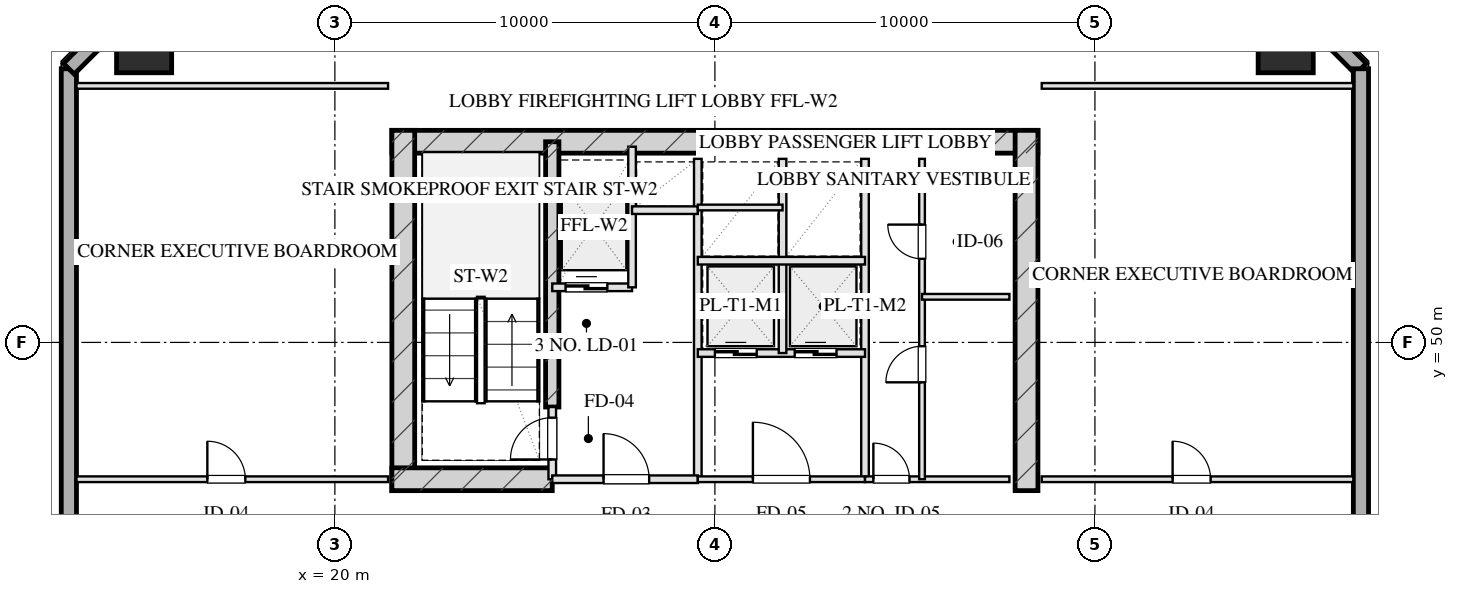
"""IFC4 building model, lengths in metres.
Left out: names, types, materials, properties, quantities, classifications, styles, units other than length and angle.
Written with IfcOpenShell. Run it as: python <this file> out.ifc"""

import sys

from ifc_helpers import new_model, si_unit, direction, frame, frame_2d, origin, origin_2d, place, context, subcontext, project, spatial, rectangle, hollow_rectangle, extrude, element, fill, save


model = new_model("IFC4")
c1 = context("Model", 3, precision=1e-05, world=origin(), true_north=direction((0.0, 1.0)))
c2 = subcontext(c1, "Body", "Model", "MODEL_VIEW")
j1 = project(units=[si_unit("LENGTHUNIT", "METRE"), si_unit("PLANEANGLEUNIT", "RADIAN")], contexts=[c1])
p1 = place(None, origin())
s1 = spatial("IfcSite", under=j1, at=p1, CompositionType="ELEMENT")
p2 = place(p1, origin())
s2 = spatial("IfcBuilding", under=s1, at=p2, CompositionType="ELEMENT")
p3 = place(p2, frame((0.0, 0.0, 170.2)))
s3 = spatial("IfcBuildingStorey", under=s2, at=p3, CompositionType="ELEMENT", Elevation=170.2)
p4 = place(p3, frame((21.5, 55.28, 0.0), z_axis=(0.0, 0.0, 1.0), x_axis=(1.0, 0.0, 0.0)))
e1 = element("IfcWall", 1, at=p4, inside=s3, PredefinedType="SHEAR", context=c2, shape_type="SweptSolid", body=[
    extrude(rectangle(XDim=17.0, YDim=0.6, at=frame_2d((8.5, 0.0))), origin(), (0.0, 0.0, 1.0), 3.45),
])
for number, where, z_axis, x_axis in (
    (2, (21.8, 46.1, 0.0), (0.0, 0.0, 1.0), (0.0, 1.0, 0.0)),
    (3, (38.2, 46.1, 0.0), (0.0, 0.0, 1.0), (0.0, 1.0, 0.0)),
):
    element("IfcWall", number, at=place(p3, frame(where, z_axis=z_axis, x_axis=x_axis)), inside=s3, PredefinedType="SHEAR", context=c2, shape_type="SweptSolid", body=[
        extrude(rectangle(XDim=9.48, YDim=0.6, at=frame_2d((4.74, 0.0))), origin(), (0.0, 0.0, 1.0), 3.45),
    ])
p5 = place(p3, frame((25.72, 48.3, 0.0), z_axis=(0.0, 0.0, 1.0), x_axis=(0.0, 1.0, 0.0)))
e4 = element("IfcWall", 4, at=p5, inside=s3, PredefinedType="SHEAR", context=c2, shape_type="SweptSolid", body=[
    extrude(rectangle(XDim=6.98, YDim=0.35, at=frame_2d((3.49, 0.0))), origin(), (0.0, 0.0, 1.0), 3.45),
])
p6 = place(p3, frame((21.5, 46.4, 0.0), z_axis=(0.0, 0.0, 1.0), x_axis=(1.0, 0.0, 0.0)))
e5 = element("IfcWall", 5, at=p6, inside=s3, PredefinedType="SHEAR", context=c2, shape_type="SweptSolid", body=[
    extrude(rectangle(XDim=4.22, YDim=0.6, at=frame_2d((2.11, 0.0))), origin(), (0.0, 0.0, 1.0), 3.45),
])
for number, where, z_axis, x_axis in (
    (6, (45.02, 57.82, 0.0), (0.0, 0.0, 1.0), (1.0, 0.0, 0.0)),
    (7, (14.98, 57.82, 0.0), (0.0, 0.0, 1.0), (1.0, 0.0, 0.0)),
):
    element("IfcColumn", number, at=place(p3, frame(where, z_axis=z_axis, x_axis=x_axis)), inside=s3, PredefinedType="COLUMN", context=c2, shape_type="SweptSolid", body=[
        extrude(hollow_rectangle(XDim=1.45, YDim=1.45, WallThickness=0.05, at=origin_2d()), origin(), (0.0, 0.0, 1.0), 3.451),
    ])
p7 = place(p3, frame((13.0, 10.8, 0.0), z_axis=(0.0, 0.0, 1.0), x_axis=(0.0, 1.0, 0.0)))
e8 = element("IfcWall", 8, at=p7, inside=s3, PredefinedType="SOLIDWALL", context=c2, shape_type="SweptSolid", body=[
    extrude(rectangle(XDim=46.4, YDim=0.4, at=frame_2d((23.2, 0.0))), origin(), (0.0, 0.0, 1.0), 2.61),
])
for number, where, z_axis, x_axis in (
    (9, (13.0, 57.2, 0.0), (0.0, 0.0, 1.0), (0.707, 0.707, 0.0)),
    (10, (44.4, 59.8, 0.0), (0.0, 0.0, 1.0), (0.707, -0.707, 0.0)),
):
    element("IfcWall", number, at=place(p3, frame(where, z_axis=z_axis, x_axis=x_axis)), inside=s3, PredefinedType="SOLIDWALL", context=c2, shape_type="SweptSolid", body=[
        extrude(rectangle(XDim=3.677, YDim=0.4, at=frame_2d((1.838, 0.0))), origin(), (0.0, 0.0, 1.0), 2.61),
    ])
p8 = place(p3, frame((47.0, 57.2, 0.0), z_axis=(0.0, 0.0, 1.0), x_axis=(0.0, -1.0, 0.0)))
e11 = element("IfcWall", 11, at=p8, inside=s3, PredefinedType="SOLIDWALL", context=c2, shape_type="SweptSolid", body=[
    extrude(rectangle(XDim=46.4, YDim=0.4, at=frame_2d((23.2, 0.0))), origin(), (0.0, 0.0, 1.0), 2.61),
])
p9 = place(p8, frame((28.475, 0.0, 0.75)))
e12 = element("IfcOpeningElement", 12, at=p9, cuts=e11, PredefinedType="OPENING", context=c2, shape_type="SweptSolid", body=[
    extrude(rectangle(XDim=2.25, YDim=1.46, at=frame_2d((1.125, 0.73))), frame((0.0, 0.21, 0.0), z_axis=(0.0, -1.0, 0.0), x_axis=(1.0, 0.0, 0.0)), (0.0, 0.0, 1.0), 0.42),
])
p10 = place(p8, frame((24.675, 0.0, 0.75)))
e13 = element("IfcOpeningElement", 13, at=p10, cuts=e11, PredefinedType="OPENING", context=c2, shape_type="SweptSolid", body=[
    extrude(rectangle(XDim=2.25, YDim=1.46, at=frame_2d((1.125, 0.73))), frame((0.0, 0.21, 0.0), z_axis=(0.0, -1.0, 0.0), x_axis=(1.0, 0.0, 0.0)), (0.0, 0.0, 1.0), 0.42),
])
p11 = place(p3, frame((25.72, 46.4, 0.0), z_axis=(0.0, 0.0, 1.0), x_axis=(0.0, 1.0, 0.0)))
e14 = element("IfcWall", 14, at=p11, inside=s3, PredefinedType="PARTITIONING", context=c2, shape_type="SweptSolid", body=[
    extrude(rectangle(XDim=1.9, YDim=0.2, at=frame_2d((0.95, 0.0))), origin(), (0.0, 0.0, 1.0), 3.175),
])
p12 = place(p11, frame((0.52, 0.0, 0.0)))
e15 = element("IfcOpeningElement", 15, at=p12, cuts=e14, PredefinedType="OPENING", context=c2, shape_type="SweptSolid", body=[
    extrude(rectangle(XDim=1.1, YDim=2.05, at=frame_2d((0.55, 1.025))), frame((0.0, 0.11, 0.0), z_axis=(0.0, -1.0, 0.0), x_axis=(1.0, 0.0, 0.0)), (0.0, 0.0, 1.0), 0.22),
])
p13 = place(p3, frame((29.55, 46.4, 0.0), z_axis=(0.0, 0.0, 1.0), x_axis=(0.0, 1.0, 0.0)))
e16 = element("IfcWall", 16, at=p13, inside=s3, PredefinedType="PARTITIONING", context=c2, shape_type="SweptSolid", body=[
    extrude(rectangle(XDim=8.43, YDim=0.2, at=frame_2d((4.215, 0.0))), origin(), (0.0, 0.0, 1.0), 3.175),
])
p14 = place(p3, frame((25.72, 46.4, 0.0), z_axis=(0.0, 0.0, 1.0), x_axis=(1.0, 0.0, 0.0)))
e17 = element("IfcWall", 17, at=p14, inside=s3, PredefinedType="PARTITIONING", context=c2, shape_type="SweptSolid", body=[
    extrude(rectangle(XDim=3.83, YDim=0.2, at=frame_2d((1.915, 0.0))), origin(), (0.0, 0.0, 1.0), 3.175),
])
p15 = place(p14, frame((1.35, 0.0, 0.0)))
e18 = element("IfcOpeningElement", 18, at=p15, cuts=e17, PredefinedType="OPENING", context=c2, shape_type="SweptSolid", body=[
    extrude(rectangle(XDim=1.2, YDim=2.05, at=frame_2d((0.6, 1.025))), frame((0.0, 0.11, 0.0), z_axis=(0.0, -1.0, 0.0), x_axis=(1.0, 0.0, 0.0)), (0.0, 0.0, 1.0), 0.22),
])
p16 = place(p3, frame((25.72, 51.45, 0.0), z_axis=(0.0, 0.0, 1.0), x_axis=(1.0, 0.0, 0.0)))
e19 = element("IfcWall", 19, at=p16, inside=s3, PredefinedType="PARTITIONING", context=c2, shape_type="SweptSolid", body=[
    extrude(rectangle(XDim=2.1, YDim=0.2, at=frame_2d((1.05, 0.0))), origin(), (0.0, 0.0, 1.0), 3.175),
])
p17 = place(p16, frame((0.35, 0.0, 0.0)))
e20 = element("IfcOpeningElement", 20, at=p17, cuts=e19, PredefinedType="OPENING", context=c2, shape_type="SweptSolid", body=[
    extrude(rectangle(XDim=1.1, YDim=2.05, at=frame_2d((0.55, 1.025))), frame((0.0, 0.11, 0.0), z_axis=(0.0, -1.0, 0.0), x_axis=(1.0, 0.0, 0.0)), (0.0, 0.0, 1.0), 0.22),
])
p18 = place(p3, frame((27.82, 51.45, 0.0), z_axis=(0.0, 0.0, 1.0), x_axis=(0.0, 1.0, 0.0)))
e21 = element("IfcWall", 21, at=p18, inside=s3, PredefinedType="PARTITIONING", context=c2, shape_type="SweptSolid", body=[
    extrude(rectangle(XDim=3.7, YDim=0.2, at=frame_2d((1.85, 0.0))), origin(), (0.0, 0.0, 1.0), 3.175),
])
p19 = place(p3, frame((27.82, 53.48, 0.0), z_axis=(0.0, 0.0, 1.0), x_axis=(1.0, 0.0, 0.0)))
e22 = element("IfcWall", 22, at=p19, inside=s3, PredefinedType="PARTITIONING", context=c2, shape_type="SweptSolid", body=[
    extrude(rectangle(XDim=1.73, YDim=0.2, at=frame_2d((0.865, 0.0))), origin(), (0.0, 0.0, 1.0), 3.175),
])
p20 = place(p3, frame((33.95, 46.4, 0.0), z_axis=(0.0, 0.0, 1.0), x_axis=(0.0, 1.0, 0.0)))
e23 = element("IfcWall", 23, at=p20, inside=s3, PredefinedType="PARTITIONING", context=c2, shape_type="SweptSolid", body=[
    extrude(rectangle(XDim=8.43, YDim=0.2, at=frame_2d((4.215, 0.0))), origin(), (0.0, 0.0, 1.0), 3.175),
])
p21 = place(p3, frame((29.55, 46.4, 0.0), z_axis=(0.0, 0.0, 1.0), x_axis=(1.0, 0.0, 0.0)))
e24 = element("IfcWall", 24, at=p21, inside=s3, PredefinedType="PARTITIONING", context=c2, shape_type="SweptSolid", body=[
    extrude(rectangle(XDim=4.4, YDim=0.15, at=frame_2d((2.2, 0.0))), origin(), (0.0, 0.0, 1.0), 3.175),
])
p22 = place(p21, frame((1.45, 0.0, 0.0)))
e25 = element("IfcOpeningElement", 25, at=p22, cuts=e24, PredefinedType="OPENING", context=c2, shape_type="SweptSolid", body=[
    extrude(rectangle(XDim=1.5, YDim=2.05, at=frame_2d((0.75, 1.025))), frame((0.0, 0.085, 0.0), z_axis=(0.0, -1.0, 0.0), x_axis=(1.0, 0.0, 0.0)), (0.0, 0.0, 1.0), 0.17),
])
p23 = place(p3, frame((29.55, 49.72, 0.0), z_axis=(0.0, 0.0, 1.0), x_axis=(1.0, 0.0, 0.0)))
e26 = element("IfcWall", 26, at=p23, inside=s3, PredefinedType="PARTITIONING", context=c2, shape_type="SweptSolid", body=[
    extrude(rectangle(XDim=4.4, YDim=0.2, at=frame_2d((2.2, 0.0))), origin(), (0.0, 0.0, 1.0), 3.175),
])
p24 = place(p23, frame((0.45, 0.0, 0.0)))
e27 = element("IfcOpeningElement", 27, at=p24, cuts=e26, PredefinedType="OPENING", context=c2, shape_type="SweptSolid", body=[
    extrude(rectangle(XDim=1.1, YDim=2.05, at=frame_2d((0.55, 1.025))), frame((0.0, 0.11, 0.0), z_axis=(0.0, -1.0, 0.0), x_axis=(1.0, 0.0, 0.0)), (0.0, 0.0, 1.0), 0.22),
])
p25 = place(p23, frame((2.55, 0.0, 0.0)))
e28 = element("IfcOpeningElement", 28, at=p25, cuts=e26, PredefinedType="OPENING", context=c2, shape_type="SweptSolid", body=[
    extrude(rectangle(XDim=1.1, YDim=2.05, at=frame_2d((0.55, 1.025))), frame((0.0, 0.11, 0.0), z_axis=(0.0, -1.0, 0.0), x_axis=(1.0, 0.0, 0.0)), (0.0, 0.0, 1.0), 0.22),
])
p26 = place(p3, frame((31.78, 49.72, 0.0), z_axis=(0.0, 0.0, 1.0), x_axis=(0.0, 1.0, 0.0)))
e29 = element("IfcWall", 29, at=p26, inside=s3, PredefinedType="PARTITIONING", context=c2, shape_type="SweptSolid", body=[
    extrude(rectangle(XDim=5.11, YDim=0.2, at=frame_2d((2.555, 0.0))), origin(), (0.0, 0.0, 1.0), 3.175),
])
p27 = place(p3, frame((29.55, 52.15, 0.0), z_axis=(0.0, 0.0, 1.0), x_axis=(1.0, 0.0, 0.0)))
e30 = element("IfcWall", 30, at=p27, inside=s3, PredefinedType="PARTITIONING", context=c2, shape_type="SweptSolid", body=[
    extrude(rectangle(XDim=4.4, YDim=0.2, at=frame_2d((2.2, 0.0))), origin(), (0.0, 0.0, 1.0), 3.175),
])
p28 = place(p3, frame((29.55, 53.55, 0.0), z_axis=(0.0, 0.0, 1.0), x_axis=(1.0, 0.0, 0.0)))
e31 = element("IfcWall", 31, at=p28, inside=s3, PredefinedType="PARTITIONING", context=c2, shape_type="SweptSolid", body=[
    extrude(rectangle(XDim=2.23, YDim=0.15, at=frame_2d((1.115, 0.0))), origin(), (0.0, 0.0, 1.0), 3.175),
])
p29 = place(p3, frame((33.95, 46.4, 0.0), z_axis=(0.0, 0.0, 1.0), x_axis=(1.0, 0.0, 0.0)))
e32 = element("IfcWall", 32, at=p29, inside=s3, PredefinedType="PARTITIONING", context=c2, shape_type="SweptSolid", body=[
    extrude(rectangle(XDim=3.8, YDim=0.15, at=frame_2d((1.9, 0.0))), origin(), (0.0, 0.0, 1.0), 3.175),
])
p30 = place(p29, frame((0.22, 0.0, 0.0)))
e33 = element("IfcOpeningElement", 33, at=p30, cuts=e32, PredefinedType="OPENING", context=c2, shape_type="SweptSolid", body=[
    extrude(rectangle(XDim=0.95, YDim=2.05, at=frame_2d((0.475, 1.025))), frame((0.0, 0.085, 0.0), z_axis=(0.0, -1.0, 0.0), x_axis=(1.0, 0.0, 0.0)), (0.0, 0.0, 1.0), 0.17),
])
p31 = place(p3, frame((35.45, 46.4, 0.0), z_axis=(0.0, 0.0, 1.0), x_axis=(0.0, 1.0, 0.0)))
e34 = element("IfcWall", 34, at=p31, inside=s3, PredefinedType="PARTITIONING", context=c2, shape_type="SweptSolid", body=[
    extrude(rectangle(XDim=8.43, YDim=0.15, at=frame_2d((4.215, 0.0))), origin(), (0.0, 0.0, 1.0), 2.815),
])
p32 = place(p31, frame((2.55, 0.0, 0.0)))
e35 = element("IfcOpeningElement", 35, at=p32, cuts=e34, PredefinedType="OPENING", context=c2, shape_type="SweptSolid", body=[
    extrude(rectangle(XDim=0.95, YDim=2.05, at=frame_2d((0.475, 1.025))), frame((0.0, 0.085, 0.0), z_axis=(0.0, -1.0, 0.0), x_axis=(1.0, 0.0, 0.0)), (0.0, 0.0, 1.0), 0.17),
])
p33 = place(p31, frame((5.8, 0.0, 0.0)))
e36 = element("IfcOpeningElement", 36, at=p33, cuts=e34, PredefinedType="OPENING", context=c2, shape_type="SweptSolid", body=[
    extrude(rectangle(XDim=0.9, YDim=2.05, at=frame_2d((0.45, 1.025))), frame((0.0, 0.085, 0.0), z_axis=(0.0, -1.0, 0.0), x_axis=(1.0, 0.0, 0.0)), (0.0, 0.0, 1.0), 0.17),
])
p34 = place(p3, frame((35.45, 51.2, 0.0), z_axis=(0.0, 0.0, 1.0), x_axis=(1.0, 0.0, 0.0)))
e37 = element("IfcWall", 37, at=p34, inside=s3, PredefinedType="PARTITIONING", context=c2, shape_type="SweptSolid", body=[
    extrude(rectangle(XDim=2.3, YDim=0.15, at=frame_2d((1.15, 0.0))), origin(), (0.0, 0.0, 1.0), 3.175),
])
p35 = place(p3, frame((13.2, 56.75, 0.0), z_axis=(0.0, 0.0, 1.0), x_axis=(1.0, 0.0, 0.0)))
e38 = element("IfcWall", 38, at=p35, inside=s3, PredefinedType="PARTITIONING", context=c2, shape_type="SweptSolid", body=[
    extrude(rectangle(XDim=8.2, YDim=0.15, at=frame_2d((4.1, 0.0))), origin(), (0.0, 0.0, 1.0), 3.175),
])
p36 = place(p3, frame((13.2, 46.4, 0.0), z_axis=(0.0, 0.0, 1.0), x_axis=(1.0, 0.0, 0.0)))
e39 = element("IfcWall", 39, at=p36, inside=s3, PredefinedType="PARTITIONING", context=c2, shape_type="SweptSolid", body=[
    extrude(rectangle(XDim=8.2, YDim=0.15, at=frame_2d((4.1, 0.0))), origin(), (0.0, 0.0, 1.0), 3.175),
])
p37 = place(p36, frame((3.444, 0.0, 0.0)))
e40 = element("IfcOpeningElement", 40, at=p37, cuts=e39, PredefinedType="OPENING", context=c2, shape_type="SweptSolid", body=[
    extrude(rectangle(XDim=1.0, YDim=2.05, at=frame_2d((0.5, 1.025))), frame((0.0, 0.085, 0.0), z_axis=(0.0, -1.0, 0.0), x_axis=(1.0, 0.0, 0.0)), (0.0, 0.0, 1.0), 0.17),
])
p38 = place(p3, frame((38.6, 56.75, 0.0), z_axis=(0.0, 0.0, 1.0), x_axis=(1.0, 0.0, 0.0)))
e41 = element("IfcWall", 41, at=p38, inside=s3, PredefinedType="PARTITIONING", context=c2, shape_type="SweptSolid", body=[
    extrude(rectangle(XDim=8.2, YDim=0.15, at=frame_2d((4.1, 0.0))), origin(), (0.0, 0.0, 1.0), 3.175),
])
p39 = place(p3, frame((38.6, 46.4, 0.0), z_axis=(0.0, 0.0, 1.0), x_axis=(1.0, 0.0, 0.0)))
e42 = element("IfcWall", 42, at=p39, inside=s3, PredefinedType="PARTITIONING", context=c2, shape_type="SweptSolid", body=[
    extrude(rectangle(XDim=8.2, YDim=0.15, at=frame_2d((4.1, 0.0))), origin(), (0.0, 0.0, 1.0), 3.175),
])
p40 = place(p39, frame((3.444, 0.0, 0.0)))
e43 = element("IfcOpeningElement", 43, at=p40, cuts=e42, PredefinedType="OPENING", context=c2, shape_type="SweptSolid", body=[
    extrude(rectangle(XDim=1.0, YDim=2.05, at=frame_2d((0.5, 1.025))), frame((0.0, 0.085, 0.0), z_axis=(0.0, -1.0, 0.0), x_axis=(1.0, 0.0, 0.0)), (0.0, 0.0, 1.0), 0.17),
])
p41 = place(p12, origin())
e44 = element("IfcDoor", 44, at=p41, inside=s3, OperationType="SINGLE_SWING_LEFT", PredefinedType="DOOR", context=c2, shape_type="SweptSolid", body=[
    extrude(rectangle(XDim=1.1, YDim=2.05, at=frame_2d((0.55, 1.025))), frame((0.0, 0.025, 0.0), z_axis=(0.0, -1.0, 0.0), x_axis=(1.0, 0.0, 0.0)), (0.0, 0.0, 1.0), 0.05),
])
fill(e15, e44)
p42 = place(p15, origin())
e45 = element("IfcDoor", 45, at=p42, inside=s3, OperationType="SINGLE_SWING_LEFT", PredefinedType="DOOR", context=c2, shape_type="SweptSolid", body=[
    extrude(rectangle(XDim=1.2, YDim=2.05, at=frame_2d((0.6, 1.025))), frame((0.0, 0.025, 0.0), z_axis=(0.0, -1.0, 0.0), x_axis=(1.0, 0.0, 0.0)), (0.0, 0.0, 1.0), 0.05),
])
fill(e18, e45)
p43 = place(p17, origin())
e46 = element("IfcDoor", 46, at=p43, inside=s3, OperationType="DOUBLE_DOOR_SLIDING", PredefinedType="DOOR", context=c2, shape_type="SweptSolid", body=[
    extrude(rectangle(XDim=1.1, YDim=2.05, at=frame_2d((0.55, 1.025))), frame((0.0, 0.025, 0.0), z_axis=(0.0, -1.0, 0.0), x_axis=(1.0, 0.0, 0.0)), (0.0, 0.0, 1.0), 0.05),
])
fill(e20, e46)
p44 = place(p22, origin())
e47 = element("IfcDoor", 47, at=p44, inside=s3, OperationType="SINGLE_SWING_LEFT", PredefinedType="DOOR", context=c2, shape_type="SweptSolid", body=[
    extrude(rectangle(XDim=1.5, YDim=2.05, at=frame_2d((0.75, 1.025))), frame((0.0, 0.025, 0.0), z_axis=(0.0, -1.0, 0.0), x_axis=(1.0, 0.0, 0.0)), (0.0, 0.0, 1.0), 0.05),
])
fill(e25, e47)
p45 = place(p24, origin())
e48 = element("IfcDoor", 48, at=p45, inside=s3, OperationType="DOUBLE_DOOR_SLIDING", PredefinedType="DOOR", context=c2, shape_type="SweptSolid", body=[
    extrude(rectangle(XDim=1.1, YDim=2.05, at=frame_2d((0.55, 1.025))), frame((0.0, 0.025, 0.0), z_axis=(0.0, -1.0, 0.0), x_axis=(1.0, 0.0, 0.0)), (0.0, 0.0, 1.0), 0.05),
])
fill(e27, e48)
p46 = place(p25, origin())
e49 = element("IfcDoor", 49, at=p46, inside=s3, OperationType="DOUBLE_DOOR_SLIDING", PredefinedType="DOOR", context=c2, shape_type="SweptSolid", body=[
    extrude(rectangle(XDim=1.1, YDim=2.05, at=frame_2d((0.55, 1.025))), frame((0.0, 0.025, 0.0), z_axis=(0.0, -1.0, 0.0), x_axis=(1.0, 0.0, 0.0)), (0.0, 0.0, 1.0), 0.05),
])
fill(e28, e49)
p47 = place(p30, origin())
e50 = element("IfcDoor", 50, at=p47, inside=s3, OperationType="SINGLE_SWING_LEFT", PredefinedType="DOOR", context=c2, shape_type="SweptSolid", body=[
    extrude(rectangle(XDim=0.95, YDim=2.05, at=frame_2d((0.475, 1.025))), frame((0.0, 0.025, 0.0), z_axis=(0.0, -1.0, 0.0), x_axis=(1.0, 0.0, 0.0)), (0.0, 0.0, 1.0), 0.05),
])
fill(e33, e50)
p48 = place(p32, origin())
e51 = element("IfcDoor", 51, at=p48, inside=s3, OperationType="SINGLE_SWING_LEFT", PredefinedType="DOOR", context=c2, shape_type="SweptSolid", body=[
    extrude(rectangle(XDim=0.95, YDim=2.05, at=frame_2d((0.475, 1.025))), frame((0.0, 0.025, 0.0), z_axis=(0.0, -1.0, 0.0), x_axis=(1.0, 0.0, 0.0)), (0.0, 0.0, 1.0), 0.05),
])
fill(e35, e51)
p49 = place(p33, origin())
e52 = element("IfcDoor", 52, at=p49, inside=s3, OperationType="SINGLE_SWING_RIGHT", PredefinedType="DOOR", context=c2, shape_type="SweptSolid", body=[
    extrude(rectangle(XDim=0.9, YDim=2.05, at=frame_2d((0.45, 1.025))), frame((0.0, 0.025, 0.0), z_axis=(0.0, -1.0, 0.0), x_axis=(1.0, 0.0, 0.0)), (0.0, 0.0, 1.0), 0.05),
])
fill(e36, e52)
p50 = place(p37, origin())
e53 = element("IfcDoor", 53, at=p50, inside=s3, OperationType="SINGLE_SWING_LEFT", PredefinedType="DOOR", context=c2, shape_type="SweptSolid", body=[
    extrude(rectangle(XDim=1.0, YDim=2.05, at=frame_2d((0.5, 1.025))), frame((0.0, 0.025, 0.0), z_axis=(0.0, -1.0, 0.0), x_axis=(1.0, 0.0, 0.0)), (0.0, 0.0, 1.0), 0.05),
])
fill(e40, e53)
p51 = place(p40, origin())
e54 = element("IfcDoor", 54, at=p51, inside=s3, OperationType="SINGLE_SWING_LEFT", PredefinedType="DOOR", context=c2, shape_type="SweptSolid", body=[
    extrude(rectangle(XDim=1.0, YDim=2.05, at=frame_2d((0.5, 1.025))), frame((0.0, 0.025, 0.0), z_axis=(0.0, -1.0, 0.0), x_axis=(1.0, 0.0, 0.0)), (0.0, 0.0, 1.0), 0.05),
])
fill(e43, e54)
save(model, sys.argv[1])
